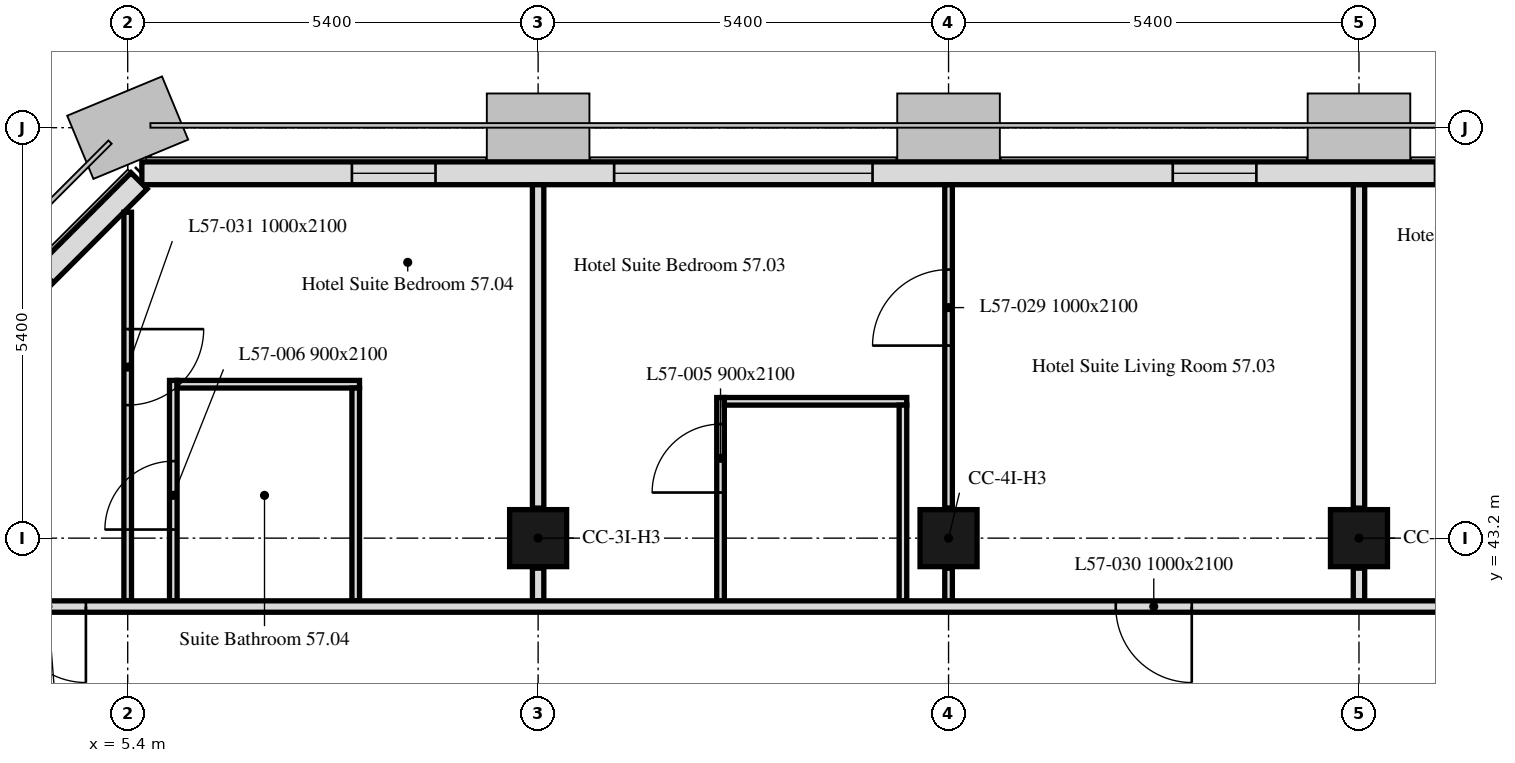
"""IFC4 building model, lengths in metres.
Left out: names, types, materials, properties, quantities, classifications, styles, units other than length and angle.
Written with IfcOpenShell. Run it as: python <this file> out.ifc"""

import sys

from ifc_helpers import new_model, si_unit, direction, frame, frame_2d, origin, origin_2d, place, context, subcontext, project, spatial, rectangle, extrude, element, fill, save


model = new_model("IFC4")
c1 = context("Model", 3, precision=1e-05, world=origin(), true_north=direction((0.0, 1.0)))
c2 = subcontext(c1, "Body", "Model", "MODEL_VIEW")
j1 = project(units=[si_unit("LENGTHUNIT", "METRE"), si_unit("PLANEANGLEUNIT", "RADIAN")], contexts=[c1])
p1 = place(None, origin())
s1 = spatial("IfcSite", under=j1, at=p1, CompositionType="ELEMENT")
p2 = place(p1, origin())
s2 = spatial("IfcBuilding", under=s1, at=p2, CompositionType="ELEMENT")
p3 = place(p2, frame((0.0, 0.0, 226.9)))
s3 = spatial("IfcBuildingStorey", under=s2, at=p3, CompositionType="ELEMENT", Elevation=226.9)
for number, where, z_axis, x_axis in (
    (1, (10.8, 43.2, 0.0), (0.0, 0.0, 1.0), (1.0, 0.0, 0.0)),
    (2, (16.2, 43.2, 0.0), (0.0, 0.0, 1.0), (1.0, 0.0, 0.0)),
    (3, (21.6, 43.2, 0.0), (0.0, 0.0, 1.0), (1.0, 0.0, 0.0)),
):
    element("IfcColumn", number, at=place(p3, frame(where, z_axis=z_axis, x_axis=x_axis)), inside=s3, PredefinedType="COLUMN", context=c2, shape_type="SweptSolid", body=[
        extrude(rectangle(XDim=0.75, YDim=0.75, at=origin_2d()), origin(), (0.0, 0.0, 1.0), 3.0),
    ])
p4 = place(p3, frame((37.614, 48.0, 0.0), z_axis=(0.0, 0.0, 1.0), x_axis=(-1.0, 0.0, 0.0)))
e4 = element("IfcWall", 4, at=p4, inside=s3, PredefinedType="SOLIDWALL", context=c2, shape_type="SweptSolid", body=[
    extrude(rectangle(XDim=32.027, YDim=0.3, at=frame_2d((16.014, 0.0))), origin(), (0.0, 0.0, 1.0), 3.0),
])
p5 = place(p4, frame((0.814, 0.0, 0.9)))
e5 = element("IfcOpeningElement", 5, at=p5, cuts=e4, PredefinedType="OPENING", context=c2, shape_type="SweptSolid", body=[
    extrude(rectangle(XDim=3.4, YDim=1.7, at=frame_2d((1.7, 0.85))), frame((0.0, 0.16, 0.0), z_axis=(0.0, -1.0, 0.0), x_axis=(1.0, 0.0, 0.0)), (0.0, 0.0, 1.0), 0.32),
])
p6 = place(p4, frame((6.564, 0.0, 0.9)))
e6 = element("IfcOpeningElement", 6, at=p6, cuts=e4, PredefinedType="OPENING", context=c2, shape_type="SweptSolid", body=[
    extrude(rectangle(XDim=1.1, YDim=1.7, at=frame_2d((0.55, 0.85))), frame((0.0, 0.16, 0.0), z_axis=(0.0, -1.0, 0.0), x_axis=(1.0, 0.0, 0.0)), (0.0, 0.0, 1.0), 0.32),
])
p7 = place(p4, frame((11.614, 0.0, 0.9)))
e7 = element("IfcOpeningElement", 7, at=p7, cuts=e4, PredefinedType="OPENING", context=c2, shape_type="SweptSolid", body=[
    extrude(rectangle(XDim=3.4, YDim=1.7, at=frame_2d((1.7, 0.85))), frame((0.0, 0.16, 0.0), z_axis=(0.0, -1.0, 0.0), x_axis=(1.0, 0.0, 0.0)), (0.0, 0.0, 1.0), 0.32),
])
p8 = place(p4, frame((17.364, 0.0, 0.9)))
e8 = element("IfcOpeningElement", 8, at=p8, cuts=e4, PredefinedType="OPENING", context=c2, shape_type="SweptSolid", body=[
    extrude(rectangle(XDim=1.1, YDim=1.7, at=frame_2d((0.55, 0.85))), frame((0.0, 0.16, 0.0), z_axis=(0.0, -1.0, 0.0), x_axis=(1.0, 0.0, 0.0)), (0.0, 0.0, 1.0), 0.32),
])
p9 = place(p4, frame((22.414, 0.0, 0.9)))
e9 = element("IfcOpeningElement", 9, at=p9, cuts=e4, PredefinedType="OPENING", context=c2, shape_type="SweptSolid", body=[
    extrude(rectangle(XDim=3.4, YDim=1.7, at=frame_2d((1.7, 0.85))), frame((0.0, 0.16, 0.0), z_axis=(0.0, -1.0, 0.0), x_axis=(1.0, 0.0, 0.0)), (0.0, 0.0, 1.0), 0.32),
])
p10 = place(p4, frame((28.164, 0.0, 0.9)))
e10 = element("IfcOpeningElement", 10, at=p10, cuts=e4, PredefinedType="OPENING", context=c2, shape_type="SweptSolid", body=[
    extrude(rectangle(XDim=1.1, YDim=1.7, at=frame_2d((0.55, 0.85))), frame((0.0, 0.16, 0.0), z_axis=(0.0, -1.0, 0.0), x_axis=(1.0, 0.0, 0.0)), (0.0, 0.0, 1.0), 0.32),
])
p11 = place(p3, frame((5.55, 47.901, 0.0), z_axis=(0.0, 0.0, 1.0), x_axis=(-0.707106781187, -0.707106781187, 0.0)))
e11 = element("IfcWall", 11, at=p11, inside=s3, PredefinedType="SOLIDWALL", context=c2, shape_type="SweptSolid", body=[
    extrude(rectangle(XDim=6.86, YDim=0.3, at=frame_2d((3.43, 0.0))), origin(), (0.0, 0.0, 1.0), 3.0),
])
p12 = place(p11, frame((1.73, 0.0, 0.9)))
e12 = element("IfcOpeningElement", 12, at=p12, cuts=e11, PredefinedType="OPENING", context=c2, shape_type="SweptSolid", body=[
    extrude(rectangle(XDim=3.4, YDim=1.7, at=frame_2d((1.7, 0.85))), frame((0.0, 0.16, 0.0), z_axis=(0.0, -1.0, 0.0), x_axis=(1.0, 0.0, 0.0)), (0.0, 0.0, 1.0), 0.32),
])
p13 = place(p3, frame((21.6, 47.849, 0.0), z_axis=(0.0, 0.0, 1.0), x_axis=(0.0, -1.0, 0.0)))
e13 = element("IfcWall", 13, at=p13, inside=s3, PredefinedType="PARTITIONING", context=c2, shape_type="SweptSolid", body=[
    extrude(rectangle(XDim=4.254, YDim=0.15, at=frame_2d((2.127, 0.0))), origin(), (0.0, 0.0, 1.0), 2.4),
])
p14 = place(p3, frame((21.6, 42.805, 0.0), z_axis=(0.0, 0.0, 1.0), x_axis=(0.0, -1.0, 0.0)))
e14 = element("IfcWall", 14, at=p14, inside=s3, PredefinedType="PARTITIONING", context=c2, shape_type="SweptSolid", body=[
    extrude(rectangle(XDim=0.43, YDim=0.15, at=frame_2d((0.215, 0.0))), origin(), (0.0, 0.0, 1.0), 2.4),
])
p15 = place(p3, frame((10.8, 47.849, 0.0), z_axis=(0.0, 0.0, 1.0), x_axis=(0.0, -1.0, 0.0)))
e15 = element("IfcWall", 15, at=p15, inside=s3, PredefinedType="PARTITIONING", context=c2, shape_type="SweptSolid", body=[
    extrude(rectangle(XDim=4.254, YDim=0.15, at=frame_2d((2.127, 0.0))), origin(), (0.0, 0.0, 1.0), 2.4),
])
p16 = place(p3, frame((10.8, 42.805, 0.0), z_axis=(0.0, 0.0, 1.0), x_axis=(0.0, -1.0, 0.0)))
e16 = element("IfcWall", 16, at=p16, inside=s3, PredefinedType="PARTITIONING", context=c2, shape_type="SweptSolid", body=[
    extrude(rectangle(XDim=0.43, YDim=0.15, at=frame_2d((0.215, 0.0))), origin(), (0.0, 0.0, 1.0), 2.4),
])
p17 = place(p3, frame((13.2, 42.375, 0.0), z_axis=(0.0, 0.0, 1.0), x_axis=(0.0, 1.0, 0.0)))
e17 = element("IfcWall", 17, at=p17, inside=s3, PredefinedType="PARTITIONING", context=c2, shape_type="SweptSolid", body=[
    extrude(rectangle(XDim=2.675, YDim=0.1, at=frame_2d((1.337, 0.0))), origin(), (0.0, 0.0, 1.0), 3.0),
])
p18 = place(p17, frame((1.425, 0.0, 0.0)))
e18 = element("IfcOpeningElement", 18, at=p18, cuts=e17, PredefinedType="OPENING", context=c2, shape_type="SweptSolid", body=[
    extrude(rectangle(XDim=0.9, YDim=2.1, at=frame_2d((0.45, 1.05))), frame((0.0, 0.05, 0.0), z_axis=(0.0, -1.0, 0.0), x_axis=(1.0, 0.0, 0.0)), (0.0, 0.0, 1.0), 0.1),
])
p19 = place(p3, frame((13.25, 45.0, 0.0), z_axis=(0.0, 0.0, 1.0), x_axis=(1.0, 0.0, 0.0)))
e19 = element("IfcWall", 19, at=p19, inside=s3, PredefinedType="PARTITIONING", context=c2, shape_type="SweptSolid", body=[
    extrude(rectangle(XDim=2.4, YDim=0.1, at=frame_2d((1.2, 0.0))), origin(), (0.0, 0.0, 1.0), 3.0),
])
p20 = place(p3, frame((15.6, 44.95, 0.0), z_axis=(0.0, 0.0, 1.0), x_axis=(0.0, -1.0, 0.0)))
e20 = element("IfcWall", 20, at=p20, inside=s3, PredefinedType="PARTITIONING", context=c2, shape_type="SweptSolid", body=[
    extrude(rectangle(XDim=2.575, YDim=0.1, at=frame_2d((1.288, 0.0))), origin(), (0.0, 0.0, 1.0), 3.0),
])
p21 = place(p3, frame((16.2, 42.375, 0.0), z_axis=(0.0, 0.0, 1.0), x_axis=(0.0, 1.0, 0.0)))
e21 = element("IfcWall", 21, at=p21, inside=s3, PredefinedType="PARTITIONING", context=c2, shape_type="SweptSolid", body=[
    extrude(rectangle(XDim=0.43, YDim=0.1, at=frame_2d((0.215, 0.0))), origin(), (0.0, 0.0, 1.0), 2.4),
])
p22 = place(p3, frame((16.2, 43.595, 0.0), z_axis=(0.0, 0.0, 1.0), x_axis=(0.0, 1.0, 0.0)))
e22 = element("IfcWall", 22, at=p22, inside=s3, PredefinedType="PARTITIONING", context=c2, shape_type="SweptSolid", body=[
    extrude(rectangle(XDim=4.254, YDim=0.1, at=frame_2d((2.127, 0.0))), origin(), (0.0, 0.0, 1.0), 2.4),
])
p23 = place(p22, frame((2.138, 0.0, 0.0)))
e23 = element("IfcOpeningElement", 23, at=p23, cuts=e22, PredefinedType="OPENING", context=c2, shape_type="SweptSolid", body=[
    extrude(rectangle(XDim=1.0, YDim=2.1, at=frame_2d((0.5, 1.05))), frame((0.0, 0.05, 0.0), z_axis=(0.0, -1.0, 0.0), x_axis=(1.0, 0.0, 0.0)), (0.0, 0.0, 1.0), 0.1),
])
p24 = place(p3, frame((5.4, 47.488, 0.0), z_axis=(0.0, 0.0, 1.0), x_axis=(0.0, -1.0, 0.0)))
e24 = element("IfcWall", 24, at=p24, inside=s3, PredefinedType="PARTITIONING", context=c2, shape_type="SweptSolid", body=[
    extrude(rectangle(XDim=5.113, YDim=0.1, at=frame_2d((2.556, 0.0))), origin(), (0.0, 0.0, 1.0), 3.0),
])
p25 = place(p24, frame((1.538, 0.0, 0.0)))
e25 = element("IfcOpeningElement", 25, at=p25, cuts=e24, PredefinedType="OPENING", context=c2, shape_type="SweptSolid", body=[
    extrude(rectangle(XDim=1.0, YDim=2.1, at=frame_2d((0.5, 1.05))), frame((0.0, 0.05, 0.0), z_axis=(0.0, -1.0, 0.0), x_axis=(1.0, 0.0, 0.0)), (0.0, 0.0, 1.0), 0.1),
])
p26 = place(p3, frame((6.0, 42.375, 0.0), z_axis=(0.0, 0.0, 1.0), x_axis=(0.0, 1.0, 0.0)))
e26 = element("IfcWall", 26, at=p26, inside=s3, PredefinedType="PARTITIONING", context=c2, shape_type="SweptSolid", body=[
    extrude(rectangle(XDim=2.9, YDim=0.1, at=frame_2d((1.45, 0.0))), origin(), (0.0, 0.0, 1.0), 3.0),
])
p27 = place(p26, frame((0.938, 0.0, 0.0)))
e27 = element("IfcOpeningElement", 27, at=p27, cuts=e26, PredefinedType="OPENING", context=c2, shape_type="SweptSolid", body=[
    extrude(rectangle(XDim=0.9, YDim=2.1, at=frame_2d((0.45, 1.05))), frame((0.0, 0.05, 0.0), z_axis=(0.0, -1.0, 0.0), x_axis=(1.0, 0.0, 0.0)), (0.0, 0.0, 1.0), 0.1),
])
p28 = place(p3, frame((6.05, 45.225, 0.0), z_axis=(0.0, 0.0, 1.0), x_axis=(1.0, 0.0, 0.0)))
e28 = element("IfcWall", 28, at=p28, inside=s3, PredefinedType="PARTITIONING", context=c2, shape_type="SweptSolid", body=[
    extrude(rectangle(XDim=2.4, YDim=0.1, at=frame_2d((1.2, 0.0))), origin(), (0.0, 0.0, 1.0), 3.0),
])
p29 = place(p3, frame((8.4, 45.175, 0.0), z_axis=(0.0, 0.0, 1.0), x_axis=(0.0, -1.0, 0.0)))
e29 = element("IfcWall", 29, at=p29, inside=s3, PredefinedType="PARTITIONING", context=c2, shape_type="SweptSolid", body=[
    extrude(rectangle(XDim=2.8, YDim=0.1, at=frame_2d((1.4, 0.0))), origin(), (0.0, 0.0, 1.0), 3.0),
])
p30 = place(p3, frame((42.449, 42.3, 0.0), z_axis=(0.0, 0.0, 1.0), x_axis=(-1.0, 0.0, 0.0)))
e30 = element("IfcWall", 30, at=p30, inside=s3, PredefinedType="PARTITIONING", context=c2, shape_type="SweptSolid", body=[
    extrude(rectangle(XDim=41.698, YDim=0.15, at=frame_2d((20.849, 0.0))), origin(), (0.0, 0.0, 1.0), 2.4),
])
p31 = place(p30, frame((1.132, 0.0, 0.0)))
e31 = element("IfcOpeningElement", 31, at=p31, cuts=e30, PredefinedType="OPENING", context=c2, shape_type="SweptSolid", body=[
    extrude(rectangle(XDim=1.0, YDim=2.1, at=frame_2d((0.5, 1.05))), frame((0.0, 0.075, 0.0), z_axis=(0.0, -1.0, 0.0), x_axis=(1.0, 0.0, 0.0)), (0.0, 0.0, 1.0), 0.15),
])
p32 = place(p30, frame((13.049, 0.0, 0.0)))
e32 = element("IfcOpeningElement", 32, at=p32, cuts=e30, PredefinedType="OPENING", context=c2, shape_type="SweptSolid", body=[
    extrude(rectangle(XDim=1.0, YDim=2.1, at=frame_2d((0.5, 1.05))), frame((0.0, 0.075, 0.0), z_axis=(0.0, -1.0, 0.0), x_axis=(1.0, 0.0, 0.0)), (0.0, 0.0, 1.0), 0.15),
])
p33 = place(p30, frame((18.449, 0.0, 0.0)))
e33 = element("IfcOpeningElement", 33, at=p33, cuts=e30, PredefinedType="OPENING", context=c2, shape_type="SweptSolid", body=[
    extrude(rectangle(XDim=1.0, YDim=2.1, at=frame_2d((0.5, 1.05))), frame((0.0, 0.075, 0.0), z_axis=(0.0, -1.0, 0.0), x_axis=(1.0, 0.0, 0.0)), (0.0, 0.0, 1.0), 0.15),
])
p34 = place(p30, frame((23.049, 0.0, 0.0)))
e34 = element("IfcOpeningElement", 34, at=p34, cuts=e30, PredefinedType="OPENING", context=c2, shape_type="SweptSolid", body=[
    extrude(rectangle(XDim=1.0, YDim=2.1, at=frame_2d((0.5, 1.05))), frame((0.0, 0.075, 0.0), z_axis=(0.0, -1.0, 0.0), x_axis=(1.0, 0.0, 0.0)), (0.0, 0.0, 1.0), 0.15),
])
p35 = place(p30, frame((37.599, 0.0, 0.0)))
e35 = element("IfcOpeningElement", 35, at=p35, cuts=e30, PredefinedType="OPENING", context=c2, shape_type="SweptSolid", body=[
    extrude(rectangle(XDim=1.0, YDim=2.1, at=frame_2d((0.5, 1.05))), frame((0.0, 0.075, 0.0), z_axis=(0.0, -1.0, 0.0), x_axis=(1.0, 0.0, 0.0)), (0.0, 0.0, 1.0), 0.15),
])
p36 = place(p8, origin())
e36 = element("IfcWindow", 36, at=p36, inside=s3, PartitioningType="SINGLE_PANEL", PredefinedType="WINDOW", context=c2, shape_type="SweptSolid", body=[
    extrude(rectangle(XDim=1.1, YDim=1.7, at=frame_2d((0.55, 0.85))), frame((0.0, 0.03, 0.0), z_axis=(0.0, -1.0, 0.0), x_axis=(1.0, 0.0, 0.0)), (0.0, 0.0, 1.0), 0.06),
])
fill(e8, e36)
p37 = place(p9, origin())
e37 = element("IfcWindow", 37, at=p37, inside=s3, PartitioningType="SINGLE_PANEL", PredefinedType="WINDOW", context=c2, shape_type="SweptSolid", body=[
    extrude(rectangle(XDim=3.4, YDim=1.7, at=frame_2d((1.7, 0.85))), frame((0.0, 0.03, 0.0), z_axis=(0.0, -1.0, 0.0), x_axis=(1.0, 0.0, 0.0)), (0.0, 0.0, 1.0), 0.06),
])
fill(e9, e37)
p38 = place(p10, origin())
e38 = element("IfcWindow", 38, at=p38, inside=s3, PartitioningType="SINGLE_PANEL", PredefinedType="WINDOW", context=c2, shape_type="SweptSolid", body=[
    extrude(rectangle(XDim=1.1, YDim=1.7, at=frame_2d((0.55, 0.85))), frame((0.0, 0.03, 0.0), z_axis=(0.0, -1.0, 0.0), x_axis=(1.0, 0.0, 0.0)), (0.0, 0.0, 1.0), 0.06),
])
fill(e10, e38)
p39 = place(p18, origin())
e39 = element("IfcDoor", 39, at=p39, inside=s3, OperationType="SINGLE_SWING_RIGHT", PredefinedType="DOOR", context=c2, shape_type="SweptSolid", body=[
    extrude(rectangle(XDim=0.9, YDim=2.1, at=frame_2d((0.45, 1.05))), frame((0.0, 0.025, 0.0), z_axis=(0.0, -1.0, 0.0), x_axis=(1.0, 0.0, 0.0)), (0.0, 0.0, 1.0), 0.05),
])
fill(e18, e39)
p40 = place(p27, origin())
e40 = element("IfcDoor", 40, at=p40, inside=s3, OperationType="SINGLE_SWING_LEFT", PredefinedType="DOOR", context=c2, shape_type="SweptSolid", body=[
    extrude(rectangle(XDim=0.9, YDim=2.1, at=frame_2d((0.45, 1.05))), frame((0.0, 0.025, 0.0), z_axis=(0.0, -1.0, 0.0), x_axis=(1.0, 0.0, 0.0)), (0.0, 0.0, 1.0), 0.05),
])
fill(e27, e40)
p41 = place(p23, origin())
e41 = element("IfcDoor", 41, at=p41, inside=s3, OperationType="SINGLE_SWING_RIGHT", PredefinedType="DOOR", context=c2, shape_type="SweptSolid", body=[
    extrude(rectangle(XDim=1.0, YDim=2.1, at=frame_2d((0.5, 1.05))), frame((0.0, 0.025, 0.0), z_axis=(0.0, -1.0, 0.0), x_axis=(1.0, 0.0, 0.0)), (0.0, 0.0, 1.0), 0.05),
])
fill(e23, e41)
p42 = place(p34, origin())
e42 = element("IfcDoor", 42, at=p42, inside=s3, OperationType="SINGLE_SWING_RIGHT", PredefinedType="DOOR", context=c2, shape_type="SweptSolid", body=[
    extrude(rectangle(XDim=1.0, YDim=2.1, at=frame_2d((0.5, 1.05))), frame((0.0, 0.025, 0.0), z_axis=(0.0, -1.0, 0.0), x_axis=(1.0, 0.0, 0.0)), (0.0, 0.0, 1.0), 0.05),
])
fill(e34, e42)
p43 = place(p25, origin())
e43 = element("IfcDoor", 43, at=p43, inside=s3, OperationType="SINGLE_SWING_LEFT", PredefinedType="DOOR", context=c2, shape_type="SweptSolid", body=[
    extrude(rectangle(XDim=1.0, YDim=2.1, at=frame_2d((0.5, 1.05))), frame((0.0, 0.025, 0.0), z_axis=(0.0, -1.0, 0.0), x_axis=(1.0, 0.0, 0.0)), (0.0, 0.0, 1.0), 0.05),
])
fill(e25, e43)
p44 = place(p35, origin())
e44 = element("IfcDoor", 44, at=p44, inside=s3, OperationType="SINGLE_SWING_RIGHT", PredefinedType="DOOR", context=c2, shape_type="SweptSolid", body=[
    extrude(rectangle(XDim=1.0, YDim=2.1, at=frame_2d((0.5, 1.05))), frame((0.0, 0.025, 0.0), z_axis=(0.0, -1.0, 0.0), x_axis=(1.0, 0.0, 0.0)), (0.0, 0.0, 1.0), 0.05),
])
fill(e35, e44)
save(model, sys.argv[1])
